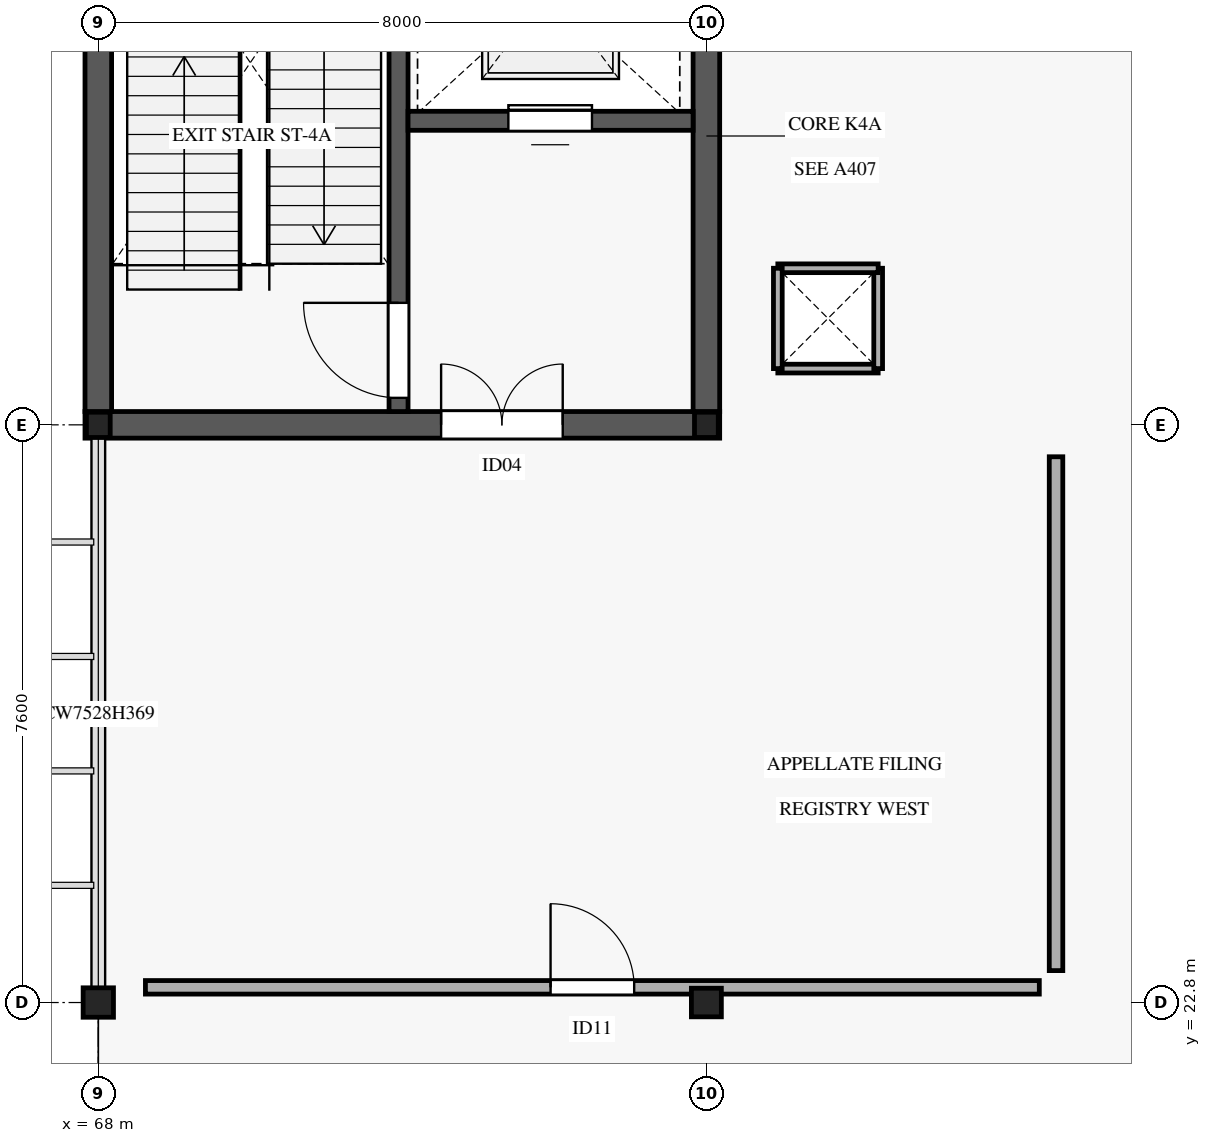
"""IFC4 building model, lengths in metres.
Left out: names, types, materials, properties, quantities, classifications, styles, units other than length and angle.
Written with IfcOpenShell. Run it as: python <this file> out.ifc"""

import sys

from ifc_helpers import new_model, si_unit, direction, frame, frame_2d, origin, origin_2d, place, context, subcontext, project, spatial, rectangle, i_section, extrude, element, fill, save


model = new_model("IFC4")
c1 = context("Model", 3, precision=1e-05, world=origin(), true_north=direction((0.0, 1.0)))
c2 = subcontext(c1, "Body", "Model", "MODEL_VIEW")
j1 = project(units=[si_unit("LENGTHUNIT", "METRE"), si_unit("PLANEANGLEUNIT", "RADIAN")], contexts=[c1])
p1 = place(None, origin())
s1 = spatial("IfcSite", under=j1, at=p1, CompositionType="ELEMENT")
p2 = place(p1, origin())
s2 = spatial("IfcBuilding", under=s1, at=p2, CompositionType="ELEMENT")
p3 = place(p2, frame((0.0, 0.0, 15.6)))
s3 = spatial("IfcBuildingStorey", under=s2, at=p3, CompositionType="ELEMENT", Elevation=15.6)
p4 = place(p3, frame((68.0, 22.8, 0.0), z_axis=(0.0, 0.0, 1.0), x_axis=(1.0, 0.0, 0.0)))
e1 = element("IfcColumn", 1, at=p4, inside=s3, PredefinedType="COLUMN", context=c2, shape_type="SweptSolid", body=[
    extrude(i_section(OverallWidth=0.399, OverallDepth=0.387, WebThickness=0.021, FlangeThickness=0.033, FilletRadius=0.015, at=origin_2d()), origin(), (0.0, 0.0, 1.0), 4.59),
])
p5 = place(p3, frame((68.0, 30.4, 0.0), z_axis=(0.0, 0.0, 1.0), x_axis=(1.0, 0.0, 0.0)))
e2 = element("IfcColumn", 2, at=p5, inside=s3, PredefinedType="COLUMN", context=c2, shape_type="SweptSolid", body=[
    extrude(i_section(OverallWidth=0.313, OverallDepth=0.333, WebThickness=0.018, FlangeThickness=0.028, FilletRadius=0.015, at=origin_2d()), origin(), (0.0, 0.0, 1.0), 4.59),
])
p6 = place(p3, frame((76.0, 22.8, 0.0), z_axis=(0.0, 0.0, 1.0), x_axis=(1.0, 0.0, 0.0)))
e3 = element("IfcColumn", 3, at=p6, inside=s3, PredefinedType="COLUMN", context=c2, shape_type="SweptSolid", body=[
    extrude(i_section(OverallWidth=0.394, OverallDepth=0.376, WebThickness=0.017, FlangeThickness=0.028, FilletRadius=0.015, at=origin_2d()), origin(), (0.0, 0.0, 1.0), 4.59),
])
p7 = place(p3, frame((76.0, 30.4, 0.0), z_axis=(0.0, 0.0, 1.0), x_axis=(1.0, 0.0, 0.0)))
e4 = element("IfcColumn", 4, at=p7, inside=s3, PredefinedType="COLUMN", context=c2, shape_type="SweptSolid", body=[
    extrude(i_section(OverallWidth=0.313, OverallDepth=0.333, WebThickness=0.018, FlangeThickness=0.028, FilletRadius=0.015, at=origin_2d()), origin(), (0.0, 0.0, 1.0), 4.59),
])
for number, where, z_axis, x_axis in (
    (5, (76.94, 31.14, 0.0), (0.0, 0.0, 1.0), (1.0, 0.0, 0.0)),
    (6, (78.26, 31.14, 0.0), (0.0, 0.0, 1.0), (0.0, 1.0, 0.0)),
    (7, (78.26, 32.46, 0.0), (0.0, 0.0, 1.0), (-1.0, 0.0, 0.0)),
    (8, (76.94, 32.46, 0.0), (0.0, 0.0, 1.0), (0.0, -1.0, 0.0)),
):
    element("IfcWall", number, at=place(p3, frame(where, z_axis=z_axis, x_axis=x_axis)), inside=s3, PredefinedType="PARTITIONING", context=c2, shape_type="SweptSolid", body=[
        extrude(rectangle(XDim=1.32, YDim=0.115, at=frame_2d((0.66, 0.0))), origin(), (0.0, 0.0, 1.0), 3.75),
    ])
p8 = place(p3, frame((67.825, 30.4, 0.0), z_axis=(0.0, 0.0, 1.0), x_axis=(1.0, 0.0, 0.0)))
e9 = element("IfcWall", 9, at=p8, inside=s3, PredefinedType="SHEAR", context=c2, shape_type="SweptSolid", body=[
    extrude(rectangle(XDim=8.35, YDim=0.35, at=frame_2d((4.175, 0.0))), origin(), (0.0, 0.0, 1.0), 4.59),
])
p9 = place(p8, frame((4.685, 0.0, 0.0)))
e10 = element("IfcOpeningElement", 10, at=p9, cuts=e9, PredefinedType="OPENING", context=c2, shape_type="SweptSolid", body=[
    extrude(rectangle(XDim=1.6, YDim=2.35, at=frame_2d((0.8, 1.175))), frame((0.0, 0.185, 0.0), z_axis=(0.0, -1.0, 0.0), x_axis=(1.0, 0.0, 0.0)), (0.0, 0.0, 1.0), 0.37),
])
for number, where, z_axis, x_axis in (
    (11, (68.0, 30.575, 0.0), (0.0, 0.0, 1.0), (0.0, 1.0, 0.0)),
    (12, (76.0, 30.575, 0.0), (0.0, 0.0, 1.0), (0.0, 1.0, 0.0)),
):
    element("IfcWall", number, at=place(p3, frame(where, z_axis=z_axis, x_axis=x_axis)), inside=s3, PredefinedType="SHEAR", context=c2, shape_type="SweptSolid", body=[
        extrude(rectangle(XDim=7.25, YDim=0.35, at=frame_2d((3.625, 0.0))), origin(), (0.0, 0.0, 1.0), 4.59),
    ])
p10 = place(p3, frame((71.95, 30.575, 0.0), z_axis=(0.0, 0.0, 1.0), x_axis=(0.0, 1.0, 0.0)))
e13 = element("IfcWall", 13, at=p10, inside=s3, PredefinedType="SHEAR", context=c2, shape_type="SweptSolid", body=[
    extrude(rectangle(XDim=7.25, YDim=0.25, at=frame_2d((3.625, 0.0))), origin(), (0.0, 0.0, 1.0), 4.59),
])
p11 = place(p10, frame((0.18, 0.0, 0.0)))
e14 = element("IfcOpeningElement", 14, at=p11, cuts=e13, PredefinedType="OPENING", context=c2, shape_type="SweptSolid", body=[
    extrude(rectangle(XDim=1.25, YDim=2.2, at=frame_2d((0.625, 1.1))), frame((0.0, 0.135, 0.0), z_axis=(0.0, -1.0, 0.0), x_axis=(1.0, 0.0, 0.0)), (0.0, 0.0, 1.0), 0.27),
])
p12 = place(p3, frame((72.075, 34.4, 0.0), z_axis=(0.0, 0.0, 1.0), x_axis=(1.0, 0.0, 0.0)))
e15 = element("IfcWall", 15, at=p12, inside=s3, PredefinedType="SHEAR", context=c2, shape_type="SweptSolid", body=[
    extrude(rectangle(XDim=3.75, YDim=0.25, at=frame_2d((1.875, 0.0))), origin(), (0.0, 0.0, 1.0), 4.59),
])
p13 = place(p12, frame((1.32, 0.0, 0.0)))
e16 = element("IfcOpeningElement", 16, at=p13, cuts=e15, PredefinedType="OPENING", context=c2, shape_type="SweptSolid", body=[
    extrude(rectangle(XDim=1.1, YDim=2.2, at=frame_2d((0.55, 1.1))), frame((0.0, 0.135, 0.0), z_axis=(0.0, -1.0, 0.0), x_axis=(1.0, 0.0, 0.0)), (0.0, 0.0, 1.0), 0.27),
])
p14 = place(p3, frame((68.62, 23.0, 0.0), z_axis=(0.0, 0.0, 1.0), x_axis=(1.0, 0.0, 0.0)))
e17 = element("IfcWall", 17, at=p14, inside=s3, PredefinedType="PARTITIONING", context=c2, shape_type="SweptSolid", body=[
    extrude(rectangle(XDim=11.76, YDim=0.178, at=frame_2d((5.88, 0.0))), origin(), (0.0, 0.0, 1.0), 3.45),
])
p15 = place(p14, frame((5.33, 0.0, 0.0)))
e18 = element("IfcOpeningElement", 18, at=p15, cuts=e17, PredefinedType="OPENING", context=c2, shape_type="SweptSolid", body=[
    extrude(rectangle(XDim=1.1, YDim=2.3, at=frame_2d((0.55, 1.15))), frame((0.0, 0.099, 0.0), z_axis=(0.0, -1.0, 0.0), x_axis=(1.0, 0.0, 0.0)), (0.0, 0.0, 1.0), 0.198),
])
p16 = place(p3, frame((80.6, 23.22, 0.0), z_axis=(0.0, 0.0, 1.0), x_axis=(0.0, 1.0, 0.0)))
e19 = element("IfcWall", 19, at=p16, inside=s3, PredefinedType="PARTITIONING", context=c2, shape_type="SweptSolid", body=[
    extrude(rectangle(XDim=6.76, YDim=0.178, at=frame_2d((3.38, 0.0))), origin(), (0.0, 0.0, 1.0), 3.45),
])
p17 = place(p11, origin())
e20 = element("IfcDoor", 20, at=p17, inside=s3, OperationType="SINGLE_SWING_RIGHT", PredefinedType="DOOR", context=c2, shape_type="SweptSolid", body=[
    extrude(rectangle(XDim=1.25, YDim=2.2, at=frame_2d((0.625, 1.1))), frame((0.0, 0.025, 0.0), z_axis=(0.0, -1.0, 0.0), x_axis=(1.0, 0.0, 0.0)), (0.0, 0.0, 1.0), 0.05),
])
fill(e14, e20)
p18 = place(p9, origin())
e21 = element("IfcDoor", 21, at=p18, inside=s3, OperationType="DOUBLE_DOOR_SINGLE_SWING", PredefinedType="DOOR", context=c2, shape_type="SweptSolid", body=[
    extrude(rectangle(XDim=1.6, YDim=2.35, at=frame_2d((0.8, 1.175))), frame((0.0, 0.025, 0.0), z_axis=(0.0, -1.0, 0.0), x_axis=(1.0, 0.0, 0.0)), (0.0, 0.0, 1.0), 0.05),
])
fill(e10, e21)
p19 = place(p13, origin())
e22 = element("IfcDoor", 22, at=p19, inside=s3, OperationType="SLIDING_TO_LEFT", PredefinedType="DOOR", context=c2, shape_type="SweptSolid", body=[
    extrude(rectangle(XDim=1.1, YDim=2.2, at=frame_2d((0.55, 1.1))), frame((0.0, 0.025, 0.0), z_axis=(0.0, -1.0, 0.0), x_axis=(1.0, 0.0, 0.0)), (0.0, 0.0, 1.0), 0.05),
])
fill(e16, e22)
p20 = place(p15, origin())
e23 = element("IfcDoor", 23, at=p20, inside=s3, OperationType="SINGLE_SWING_LEFT", PredefinedType="DOOR", context=c2, shape_type="SweptSolid", body=[
    extrude(rectangle(XDim=1.1, YDim=2.3, at=frame_2d((0.55, 1.15))), frame((0.0, 0.025, 0.0), z_axis=(0.0, -1.0, 0.0), x_axis=(1.0, 0.0, 0.0)), (0.0, 0.0, 1.0), 0.05),
])
fill(e18, e23)
save(model, sys.argv[1])
